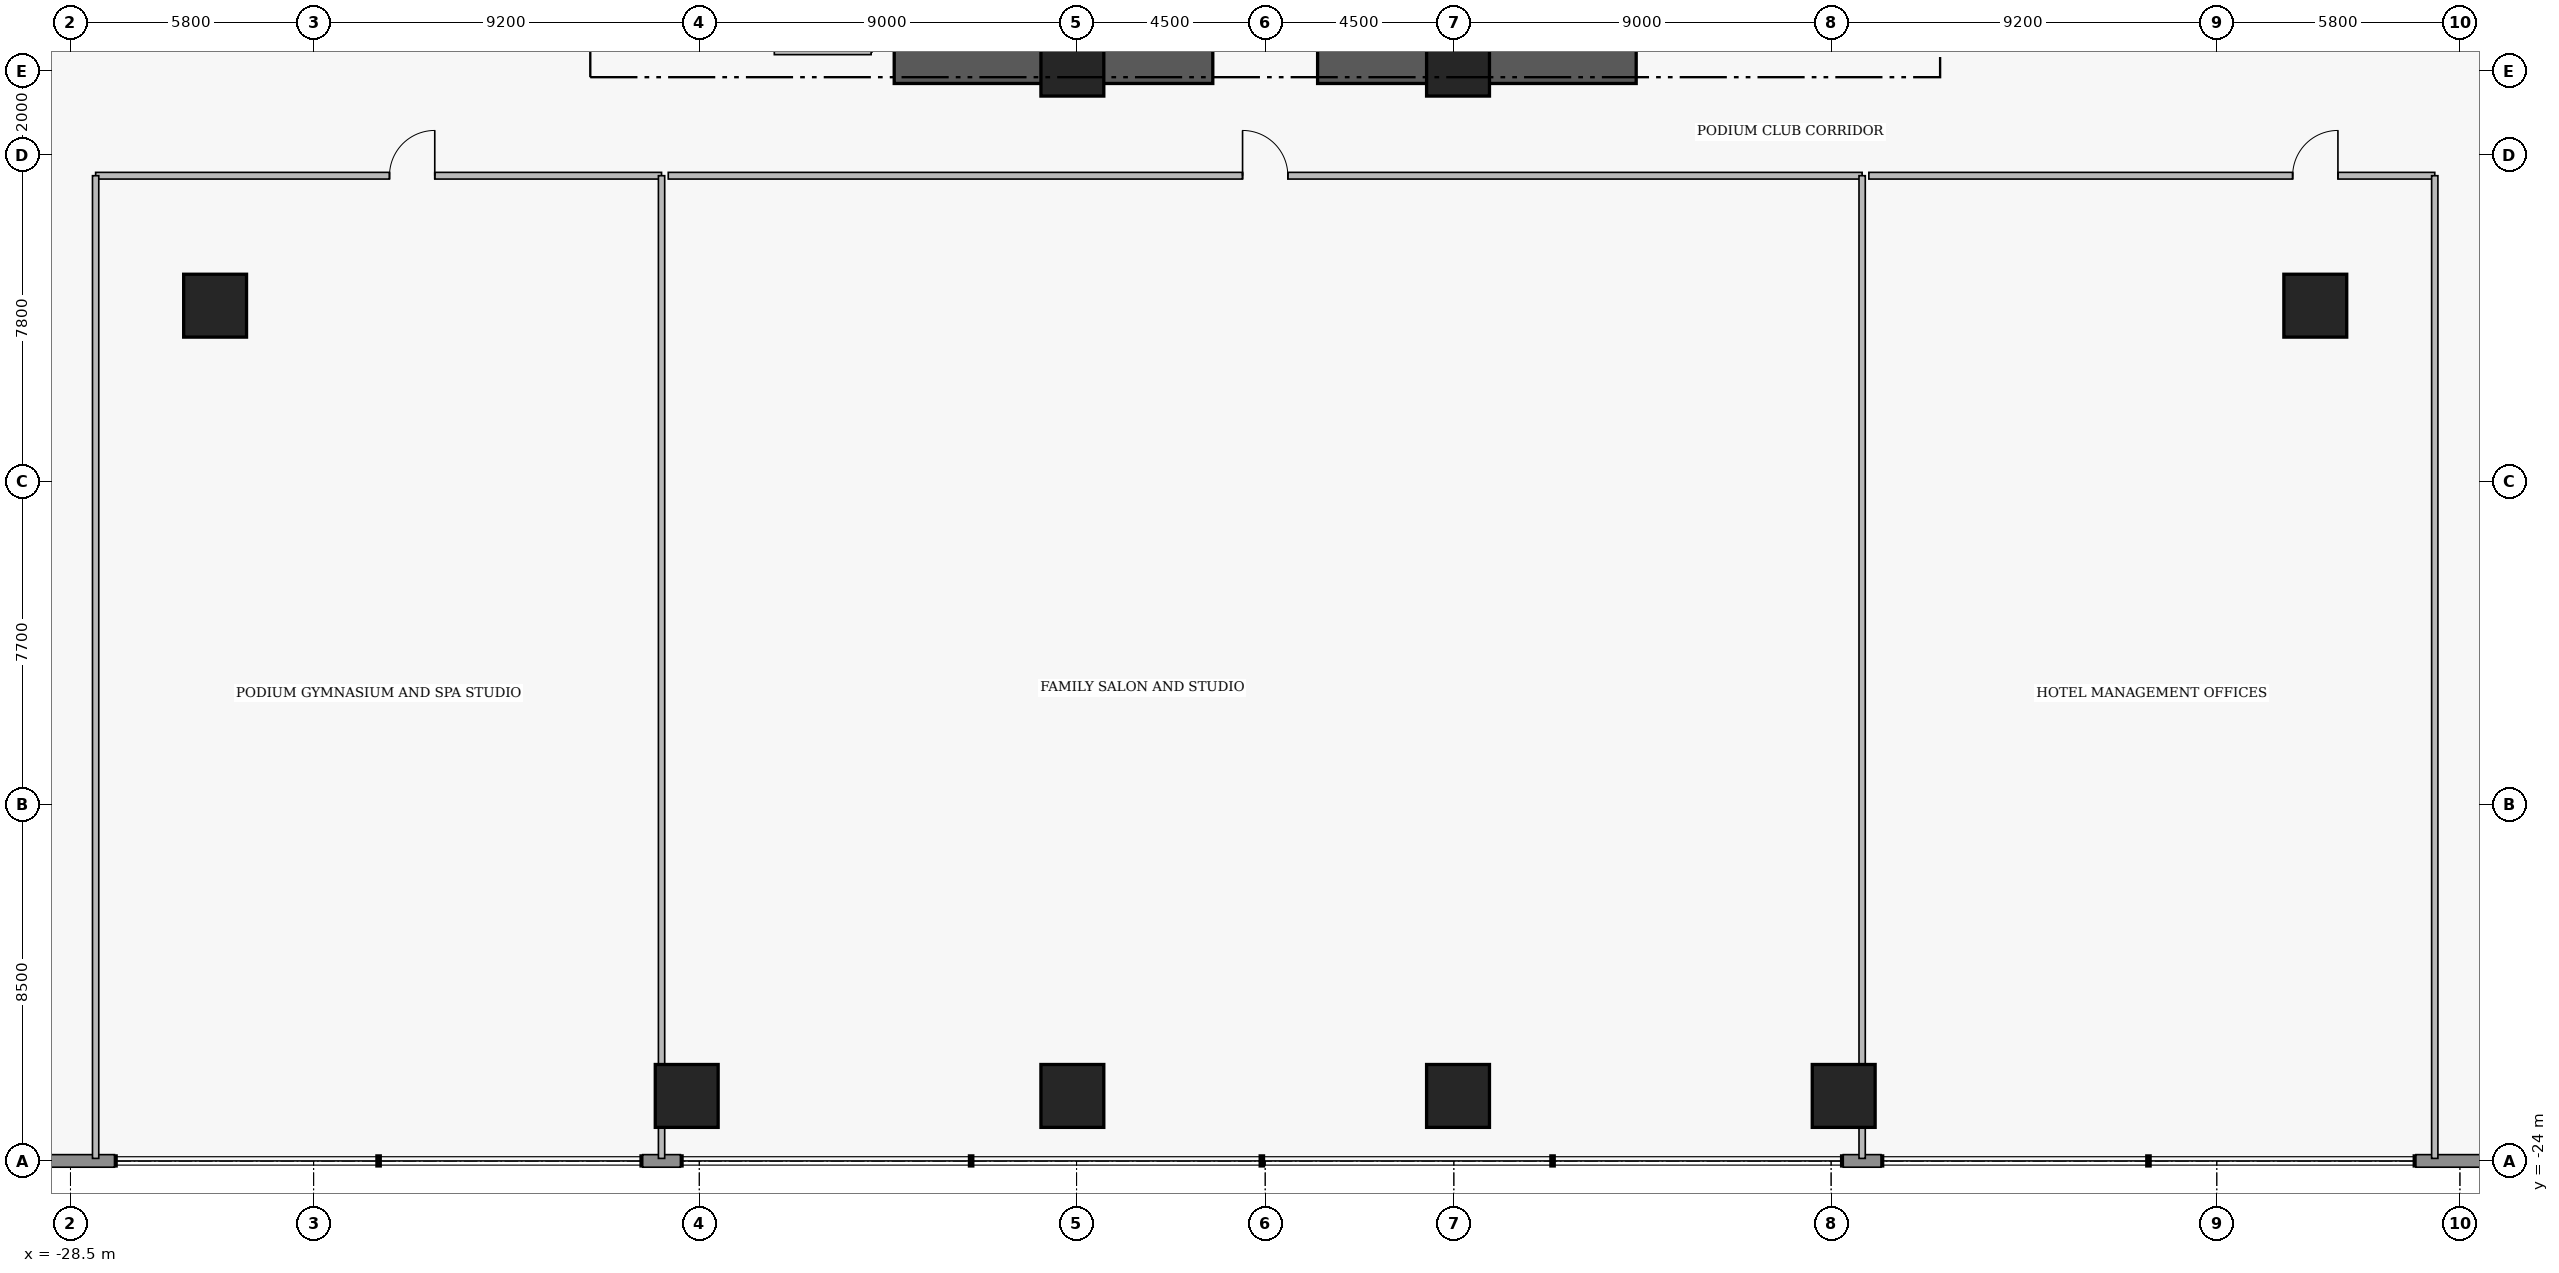
"""IFC4 building model, lengths in metres.
Left out: names, types, materials, properties, quantities, classifications, styles, units other than length and angle.
Written with IfcOpenShell. Run it as: python <this file> out.ifc"""

import sys

from ifc_helpers import new_model, si_unit, direction, frame, frame_2d, origin, origin_2d, place, context, subcontext, project, spatial, rectangle, extrude, element, fill, save


model = new_model("IFC4")
c1 = context("Model", 3, precision=1e-05, world=origin(), true_north=direction((0.0, 1.0)))
c2 = subcontext(c1, "Body", "Model", "MODEL_VIEW")
j1 = project(units=[si_unit("LENGTHUNIT", "METRE"), si_unit("PLANEANGLEUNIT", "RADIAN")], contexts=[c1])
p1 = place(None, origin())
s1 = spatial("IfcSite", under=j1, at=p1, CompositionType="ELEMENT")
p2 = place(p1, origin())
s2 = spatial("IfcBuilding", under=s1, at=p2, CompositionType="ELEMENT")
p3 = place(p2, frame((0.0, 0.0, 22.8)))
s3 = spatial("IfcBuildingStorey", under=s2, at=p3, CompositionType="ELEMENT", Elevation=22.8)
for number, where, z_axis, x_axis in (
    (1, (-8.85, 2.15, 0.0), (0.0, 0.0, 1.0), (1.0, 0.0, 0.0)),
    (2, (1.25, 2.15, 0.0), (0.0, 0.0, 1.0), (1.0, 0.0, 0.0)),
):
    element("IfcWall", number, at=place(p3, frame(where, z_axis=z_axis, x_axis=x_axis)), inside=s3, PredefinedType="SHEAR", context=c2, shape_type="SweptSolid", body=[
        extrude(rectangle(XDim=7.6, YDim=0.9, at=frame_2d((3.8, 0.0))), origin(), (0.0, 0.0, 1.0), 4.58),
    ])
for number, where, z_axis, x_axis in (
    (3, (-4.6, 2.15, 0.0), (0.0, 0.0, 1.0), (1.0, 0.0, 0.0)),
    (4, (4.6, 2.15, 0.0), (0.0, 0.0, 1.0), (1.0, 0.0, 0.0)),
    (5, (-13.8, -22.45, 0.0), (0.0, 0.0, 1.0), (1.0, 0.0, 0.0)),
    (6, (-4.6, -22.45, 0.0), (0.0, 0.0, 1.0), (1.0, 0.0, 0.0)),
    (7, (4.6, -22.45, 0.0), (0.0, 0.0, 1.0), (1.0, 0.0, 0.0)),
    (8, (13.8, -22.45, 0.0), (0.0, 0.0, 1.0), (1.0, 0.0, 0.0)),
    (9, (-25.05, -3.6, 0.0), (0.0, 0.0, 1.0), (1.0, 0.0, 0.0)),
    (10, (25.05, -3.6, 0.0), (0.0, 0.0, 1.0), (1.0, 0.0, 0.0)),
):
    element("IfcColumn", number, at=place(p3, frame(where, z_axis=z_axis, x_axis=x_axis)), inside=s3, PredefinedType="COLUMN", context=c2, shape_type="SweptSolid", body=[
        extrude(rectangle(XDim=1.5, YDim=1.5, at=origin_2d()), origin(), (0.0, 0.0, 1.0), 4.8),
    ])
p4 = place(p3, frame((32.0, -24.0, 0.0), z_axis=(0.0, 0.0, 1.0), x_axis=(-1.0, 0.0, 0.0)))
e11 = element("IfcWall", 11, at=p4, inside=s3, PredefinedType="STANDARD", context=c2, shape_type="SweptSolid", body=[
    extrude(rectangle(XDim=4.55, YDim=0.3, at=frame_2d((2.275, 0.0))), origin(), (0.0, 0.0, 1.0), 4.58),
])
p5 = place(p3, frame((14.69, -24.0, 0.0), z_axis=(0.0, 0.0, 1.0), x_axis=(-1.0, 0.0, 0.0)))
e12 = element("IfcWall", 12, at=p5, inside=s3, PredefinedType="STANDARD", context=c2, shape_type="SweptSolid", body=[
    extrude(rectangle(XDim=0.9, YDim=0.3, at=frame_2d((0.45, 0.0))), origin(), (0.0, 0.0, 1.0), 4.58),
])
p6 = place(p3, frame((-13.95, -24.0, 0.0), z_axis=(0.0, 0.0, 1.0), x_axis=(-1.0, 0.0, 0.0)))
e13 = element("IfcWall", 13, at=p6, inside=s3, PredefinedType="STANDARD", context=c2, shape_type="SweptSolid", body=[
    extrude(rectangle(XDim=0.9, YDim=0.3, at=frame_2d((0.45, 0.0))), origin(), (0.0, 0.0, 1.0), 4.58),
])
p7 = place(p3, frame((-27.45, -24.0, 0.0), z_axis=(0.0, 0.0, 1.0), x_axis=(-1.0, 0.0, 0.0)))
e14 = element("IfcWall", 14, at=p7, inside=s3, PredefinedType="STANDARD", context=c2, shape_type="SweptSolid", body=[
    extrude(rectangle(XDim=4.55, YDim=0.3, at=frame_2d((2.275, 0.0))), origin(), (0.0, 0.0, 1.0), 4.58),
])
p8 = place(p3, frame((-27.9, -0.5, 0.0), z_axis=(0.0, 0.0, 1.0), x_axis=(1.0, 0.0, 0.0)))
e15 = element("IfcWall", 15, at=p8, inside=s3, PredefinedType="PARTITIONING", context=c2, shape_type="SweptSolid", body=[
    extrude(rectangle(XDim=13.5, YDim=0.16, at=frame_2d((6.75, 0.0))), origin(), (0.0, 0.0, 1.0), 4.58),
])
p9 = place(p8, frame((7.01, 0.0, 0.0)))
e16 = element("IfcOpeningElement", 16, at=p9, cuts=e15, PredefinedType="OPENING", context=c2, shape_type="SweptSolid", body=[
    extrude(rectangle(XDim=1.08, YDim=2.18, at=frame_2d((0.54, 1.09))), frame((0.0, 0.09, 0.0), z_axis=(0.0, -1.0, 0.0), x_axis=(1.0, 0.0, 0.0)), (0.0, 0.0, 1.0), 0.18),
])
p10 = place(p3, frame((-14.24, -0.5, 0.0), z_axis=(0.0, 0.0, 1.0), x_axis=(1.0, 0.0, 0.0)))
e17 = element("IfcWall", 17, at=p10, inside=s3, PredefinedType="PARTITIONING", context=c2, shape_type="SweptSolid", body=[
    extrude(rectangle(XDim=28.48, YDim=0.16, at=frame_2d((14.24, 0.0))), origin(), (0.0, 0.0, 1.0), 4.58),
])
p11 = place(p10, frame((13.7, 0.0, 0.0)))
e18 = element("IfcOpeningElement", 18, at=p11, cuts=e17, PredefinedType="OPENING", context=c2, shape_type="SweptSolid", body=[
    extrude(rectangle(XDim=1.08, YDim=2.18, at=frame_2d((0.54, 1.09))), frame((0.0, 0.09, 0.0), z_axis=(0.0, -1.0, 0.0), x_axis=(1.0, 0.0, 0.0)), (0.0, 0.0, 1.0), 0.18),
])
p12 = place(p3, frame((14.4, -0.5, 0.0), z_axis=(0.0, 0.0, 1.0), x_axis=(1.0, 0.0, 0.0)))
e19 = element("IfcWall", 19, at=p12, inside=s3, PredefinedType="PARTITIONING", context=c2, shape_type="SweptSolid", body=[
    extrude(rectangle(XDim=13.5, YDim=0.16, at=frame_2d((6.75, 0.0))), origin(), (0.0, 0.0, 1.0), 4.58),
])
p13 = place(p12, frame((10.11, 0.0, 0.0)))
e20 = element("IfcOpeningElement", 20, at=p13, cuts=e19, PredefinedType="OPENING", context=c2, shape_type="SweptSolid", body=[
    extrude(rectangle(XDim=1.08, YDim=2.18, at=frame_2d((0.54, 1.09))), frame((0.0, 0.09, 0.0), z_axis=(0.0, -1.0, 0.0), x_axis=(1.0, 0.0, 0.0)), (0.0, 0.0, 1.0), 0.18),
])
p14 = place(p3, frame((-11.71, 2.47, 0.0), z_axis=(0.0, 0.0, 1.0), x_axis=(1.0, 0.0, 0.0)))
e21 = element("IfcWall", 21, at=p14, inside=s3, PredefinedType="PARTITIONING", context=c2, shape_type="SweptSolid", body=[
    extrude(rectangle(XDim=2.31, YDim=0.165, at=frame_2d((1.155, 0.0))), origin(), (0.0, 0.0, 1.0), 3.18),
])
for number, where, z_axis, x_axis in (
    (22, (-27.9, -23.94, 0.0), (0.0, 0.0, 1.0), (0.0, 1.0, 0.0)),
    (23, (-14.4, -23.94, 0.0), (0.0, 0.0, 1.0), (0.0, 1.0, 0.0)),
):
    element("IfcWall", number, at=place(p3, frame(where, z_axis=z_axis, x_axis=x_axis)), inside=s3, PredefinedType="PARTITIONING", context=c2, shape_type="SweptSolid", body=[
        extrude(rectangle(XDim=23.44, YDim=0.15, at=frame_2d((11.72, 0.0))), origin(), (0.0, 0.0, 1.0), 4.58),
    ])
p15 = place(p3, frame((14.24, -23.94, 0.0), z_axis=(0.0, 0.0, 1.0), x_axis=(0.0, 1.0, 0.0)))
e24 = element("IfcWall", 24, at=p15, inside=s3, PredefinedType="PARTITIONING", context=c2, shape_type="SweptSolid", body=[
    extrude(rectangle(XDim=23.44, YDim=0.15, at=frame_2d((11.72, 0.0))), origin(), (0.0, 0.0, 1.0), 3.818),
])
p16 = place(p3, frame((27.9, -23.94, 0.0), z_axis=(0.0, 0.0, 1.0), x_axis=(0.0, 1.0, 0.0)))
e25 = element("IfcWall", 25, at=p16, inside=s3, PredefinedType="PARTITIONING", context=c2, shape_type="SweptSolid", body=[
    extrude(rectangle(XDim=23.44, YDim=0.15, at=frame_2d((11.72, 0.0))), origin(), (0.0, 0.0, 1.0), 4.58),
])
p17 = place(p9, origin())
e26 = element("IfcDoor", 26, at=p17, inside=s3, OperationType="SINGLE_SWING_RIGHT", PredefinedType="DOOR", context=c2, shape_type="SweptSolid", body=[
    extrude(rectangle(XDim=1.08, YDim=2.18, at=frame_2d((0.54, 1.09))), frame((0.0, 0.025, 0.0), z_axis=(0.0, -1.0, 0.0), x_axis=(1.0, 0.0, 0.0)), (0.0, 0.0, 1.0), 0.05),
])
fill(e16, e26)
p18 = place(p11, origin())
e27 = element("IfcDoor", 27, at=p18, inside=s3, OperationType="SINGLE_SWING_LEFT", PredefinedType="DOOR", context=c2, shape_type="SweptSolid", body=[
    extrude(rectangle(XDim=1.08, YDim=2.18, at=frame_2d((0.54, 1.09))), frame((0.0, 0.025, 0.0), z_axis=(0.0, -1.0, 0.0), x_axis=(1.0, 0.0, 0.0)), (0.0, 0.0, 1.0), 0.05),
])
fill(e18, e27)
p19 = place(p13, origin())
e28 = element("IfcDoor", 28, at=p19, inside=s3, OperationType="SINGLE_SWING_RIGHT", PredefinedType="DOOR", context=c2, shape_type="SweptSolid", body=[
    extrude(rectangle(XDim=1.08, YDim=2.18, at=frame_2d((0.54, 1.09))), frame((0.0, 0.025, 0.0), z_axis=(0.0, -1.0, 0.0), x_axis=(1.0, 0.0, 0.0)), (0.0, 0.0, 1.0), 0.05),
])
fill(e20, e28)
save(model, sys.argv[1])
